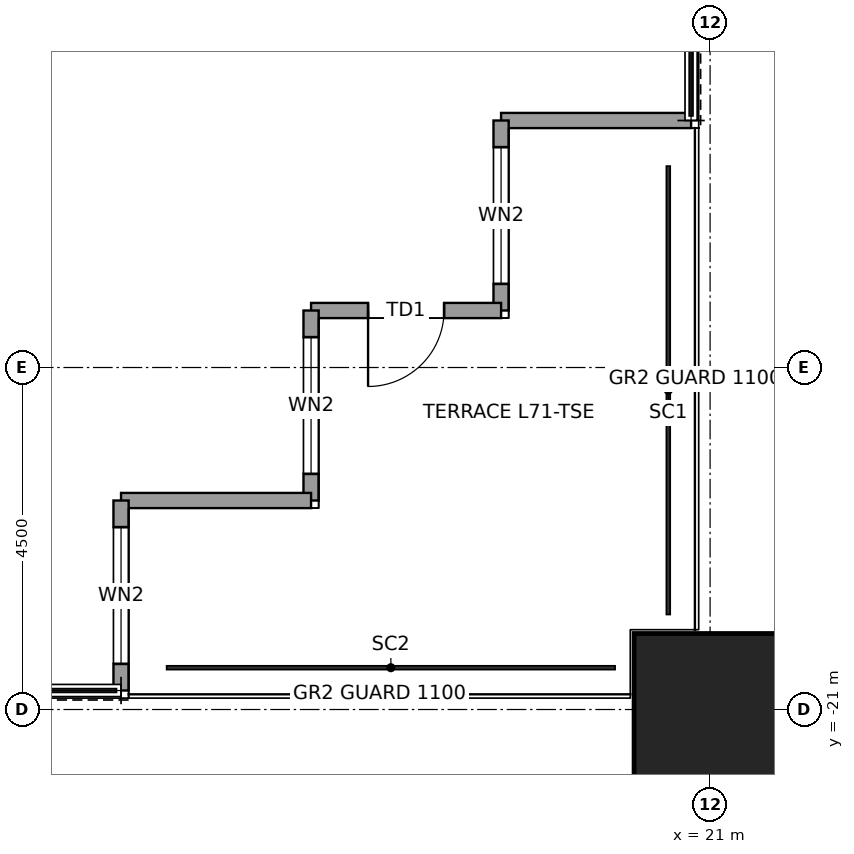
"""IFC4 building model, lengths in metres.
Left out: names, types, materials, properties, quantities, classifications, styles, units other than length and angle.
Written with IfcOpenShell. Run it as: python <this file> out.ifc"""

import sys

from ifc_helpers import new_model, si_unit, direction, frame, frame_2d, origin, origin_2d, place, context, subcontext, project, spatial, rectangle, hollow_rectangle, extrude, element, fill, save


model = new_model("IFC4")
c1 = context("Model", 3, precision=1e-05, world=origin(), true_north=direction((0.0, 1.0)))
c2 = subcontext(c1, "Body", "Model", "MODEL_VIEW")
j1 = project(units=[si_unit("LENGTHUNIT", "METRE"), si_unit("PLANEANGLEUNIT", "RADIAN")], contexts=[c1])
p1 = place(None, origin())
s1 = spatial("IfcSite", under=j1, at=p1, CompositionType="ELEMENT")
p2 = place(p1, origin())
s2 = spatial("IfcBuilding", under=s1, at=p2, CompositionType="ELEMENT")
p3 = place(p2, frame((0.0, 0.0, 319.9)))
s3 = spatial("IfcBuildingStorey", under=s2, at=p3, CompositionType="ELEMENT", Elevation=319.9)
p4 = place(p3, frame((21.0, -21.0, 0.0), z_axis=(0.0, 0.0, 1.0), x_axis=(1.0, 0.0, 0.0)))
e1 = element("IfcColumn", 1, at=p4, inside=s3, PredefinedType="COLUMN", context=c2, shape_type="SweptSolid", body=[
    extrude(hollow_rectangle(XDim=2.0, YDim=2.0, WallThickness=0.095, at=origin_2d()), origin(), (0.0, 0.0, 1.0), 4.0),
])
p5 = place(p3, frame((20.75, -13.25, 0.0), z_axis=(0.0, 0.0, 1.0), x_axis=(-1.0, 0.0, 0.0)))
e2 = element("IfcWall", 2, at=p5, inside=s3, PredefinedType="SOLIDWALL", context=c2, shape_type="SweptSolid", body=[
    extrude(rectangle(XDim=2.5, YDim=0.2, at=frame_2d((1.25, 0.0))), origin(), (0.0, 0.0, 1.0), 3.85),
])
p6 = place(p3, frame((18.25, -13.25, 0.0), z_axis=(0.0, 0.0, 1.0), x_axis=(0.0, -1.0, 0.0)))
e3 = element("IfcWall", 3, at=p6, inside=s3, PredefinedType="SOLIDWALL", context=c2, shape_type="SweptSolid", body=[
    extrude(rectangle(XDim=2.5, YDim=0.2, at=frame_2d((1.25, 0.0))), origin(), (0.0, 0.0, 1.0), 3.85),
])
p7 = place(p6, frame((0.35, 0.0, 0.3)))
e4 = element("IfcOpeningElement", 4, at=p7, cuts=e3, PredefinedType="OPENING", context=c2, shape_type="SweptSolid", body=[
    extrude(rectangle(XDim=1.8, YDim=2.4, at=frame_2d((0.9, 1.2))), frame((0.0, 0.11, 0.0), z_axis=(0.0, -1.0, 0.0), x_axis=(1.0, 0.0, 0.0)), (0.0, 0.0, 1.0), 0.22),
])
p8 = place(p3, frame((18.25, -15.75, 0.0), z_axis=(0.0, 0.0, 1.0), x_axis=(-1.0, 0.0, 0.0)))
e5 = element("IfcWall", 5, at=p8, inside=s3, PredefinedType="SOLIDWALL", context=c2, shape_type="SweptSolid", body=[
    extrude(rectangle(XDim=2.5, YDim=0.2, at=frame_2d((1.25, 0.0))), origin(), (0.0, 0.0, 1.0), 3.317),
])
p9 = place(p8, frame((0.75, 0.0, 0.0)))
e6 = element("IfcOpeningElement", 6, at=p9, cuts=e5, PredefinedType="OPENING", context=c2, shape_type="SweptSolid", body=[
    extrude(rectangle(XDim=1.0, YDim=2.4, at=frame_2d((0.5, 1.2))), frame((0.0, 0.11, 0.0), z_axis=(0.0, -1.0, 0.0), x_axis=(1.0, 0.0, 0.0)), (0.0, 0.0, 1.0), 0.22),
])
p10 = place(p3, frame((15.75, -15.75, 0.0), z_axis=(0.0, 0.0, 1.0), x_axis=(0.0, -1.0, 0.0)))
e7 = element("IfcWall", 7, at=p10, inside=s3, PredefinedType="SOLIDWALL", context=c2, shape_type="SweptSolid", body=[
    extrude(rectangle(XDim=2.5, YDim=0.2, at=frame_2d((1.25, 0.0))), origin(), (0.0, 0.0, 1.0), 3.85),
])
p11 = place(p10, frame((0.35, 0.0, 0.3)))
e8 = element("IfcOpeningElement", 8, at=p11, cuts=e7, PredefinedType="OPENING", context=c2, shape_type="SweptSolid", body=[
    extrude(rectangle(XDim=1.8, YDim=2.4, at=frame_2d((0.9, 1.2))), frame((0.0, 0.11, 0.0), z_axis=(0.0, -1.0, 0.0), x_axis=(1.0, 0.0, 0.0)), (0.0, 0.0, 1.0), 0.22),
])
p12 = place(p3, frame((15.75, -18.25, 0.0), z_axis=(0.0, 0.0, 1.0), x_axis=(-1.0, 0.0, 0.0)))
e9 = element("IfcWall", 9, at=p12, inside=s3, PredefinedType="SOLIDWALL", context=c2, shape_type="SweptSolid", body=[
    extrude(rectangle(XDim=2.5, YDim=0.2, at=frame_2d((1.25, 0.0))), origin(), (0.0, 0.0, 1.0), 3.85),
])
p13 = place(p3, frame((13.25, -18.25, 0.0), z_axis=(0.0, 0.0, 1.0), x_axis=(0.0, -1.0, 0.0)))
e10 = element("IfcWall", 10, at=p13, inside=s3, PredefinedType="SOLIDWALL", context=c2, shape_type="SweptSolid", body=[
    extrude(rectangle(XDim=2.5, YDim=0.2, at=frame_2d((1.25, 0.0))), origin(), (0.0, 0.0, 1.0), 3.85),
])
p14 = place(p13, frame((0.35, 0.0, 0.3)))
e11 = element("IfcOpeningElement", 11, at=p14, cuts=e10, PredefinedType="OPENING", context=c2, shape_type="SweptSolid", body=[
    extrude(rectangle(XDim=1.8, YDim=2.4, at=frame_2d((0.9, 1.2))), frame((0.0, 0.11, 0.0), z_axis=(0.0, -1.0, 0.0), x_axis=(1.0, 0.0, 0.0)), (0.0, 0.0, 1.0), 0.22),
])
p15 = place(p7, origin())
e12 = element("IfcWindow", 12, at=p15, inside=s3, PartitioningType="SINGLE_PANEL", PredefinedType="WINDOW", context=c2, shape_type="SweptSolid", body=[
    extrude(rectangle(XDim=1.8, YDim=2.4, at=frame_2d((0.9, 1.2))), frame((0.0, 0.03, 0.0), z_axis=(0.0, -1.0, 0.0), x_axis=(1.0, 0.0, 0.0)), (0.0, 0.0, 1.0), 0.06),
])
fill(e4, e12)
p16 = place(p9, origin())
e13 = element("IfcDoor", 13, at=p16, inside=s3, OperationType="SINGLE_SWING_RIGHT", PredefinedType="DOOR", context=c2, shape_type="SweptSolid", body=[
    extrude(rectangle(XDim=1.0, YDim=2.4, at=frame_2d((0.5, 1.2))), frame((0.0, 0.025, 0.0), z_axis=(0.0, -1.0, 0.0), x_axis=(1.0, 0.0, 0.0)), (0.0, 0.0, 1.0), 0.05),
])
fill(e6, e13)
p17 = place(p11, origin())
e14 = element("IfcWindow", 14, at=p17, inside=s3, PartitioningType="SINGLE_PANEL", PredefinedType="WINDOW", context=c2, shape_type="SweptSolid", body=[
    extrude(rectangle(XDim=1.8, YDim=2.4, at=frame_2d((0.9, 1.2))), frame((0.0, 0.03, 0.0), z_axis=(0.0, -1.0, 0.0), x_axis=(1.0, 0.0, 0.0)), (0.0, 0.0, 1.0), 0.06),
])
fill(e8, e14)
p18 = place(p14, origin())
e15 = element("IfcWindow", 15, at=p18, inside=s3, PartitioningType="SINGLE_PANEL", PredefinedType="WINDOW", context=c2, shape_type="SweptSolid", body=[
    extrude(rectangle(XDim=1.8, YDim=2.4, at=frame_2d((0.9, 1.2))), frame((0.0, 0.03, 0.0), z_axis=(0.0, -1.0, 0.0), x_axis=(1.0, 0.0, 0.0)), (0.0, 0.0, 1.0), 0.06),
])
fill(e11, e15)
save(model, sys.argv[1])
